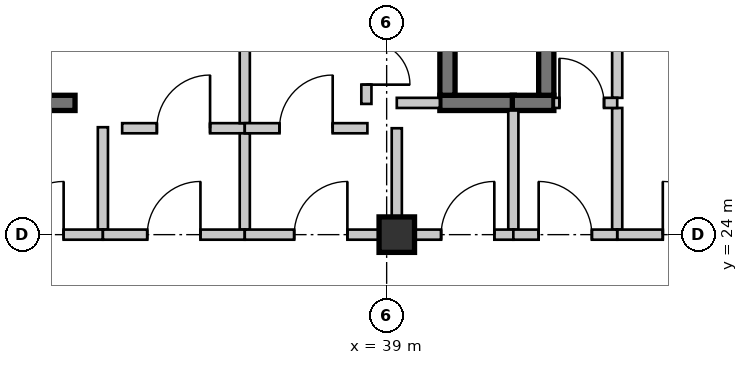
"""IFC4 building model, lengths in metres.
Left out: names, types, materials, properties, quantities, classifications, styles, units other than length and angle.
Written with IfcOpenShell. Run it as: python <this file> out.ifc"""

import sys

from ifc_helpers import new_model, si_unit, direction, frame, frame_2d, origin, origin_2d, place, context, subcontext, project, spatial, rectangle, extrude, source, transform, mapped, element, fill, save


model = new_model("IFC4")
c1 = context("Model", 3, precision=1e-05, world=origin(), true_north=direction((0.0, 1.0)))
c2 = subcontext(c1, "Body", "Model", "MODEL_VIEW")
j1 = project(units=[si_unit("LENGTHUNIT", "METRE"), si_unit("PLANEANGLEUNIT", "RADIAN")], contexts=[c1])
p1 = place(None, origin())
s1 = spatial("IfcSite", under=j1, at=p1, CompositionType="ELEMENT")
p2 = place(p1, origin())
s2 = spatial("IfcBuilding", under=s1, at=p2, CompositionType="ELEMENT")
p3 = place(p2, frame((0.0, 0.0, 65.1)))
s3 = spatial("IfcBuildingStorey", under=s2, at=p3, CompositionType="ELEMENT", Elevation=65.1)
m1 = source(origin(), c2, "Body", "SweptSolid", [
    extrude(rectangle(XDim=0.7, YDim=0.7, at=origin_2d()), origin(), (0.0, 0.0, 1.0), 3.15),
])
p4 = place(p3, frame((39.2, 24.0, 0.0), z_axis=(0.0, 0.0, 1.0), x_axis=(1.0, 0.0, 0.0)))
e1 = element("IfcColumn", 1, at=p4, inside=s3, PredefinedType="COLUMN", context=c2, shape_type="MappedRepresentation", body=[
    mapped(m1, transform((0.0, 0.0, 0.0), scale=1.0)),
])
m2 = source(origin(), c2, "Body", "SweptSolid", [
    extrude(rectangle(XDim=2.4, YDim=0.2, at=frame_2d((1.2, 0.0))), origin(), (0.0, 0.0, 1.0), 2.93),
])
p5 = place(p3, frame((43.55, 26.5, 0.0), z_axis=(0.0, 0.0, 1.0), x_axis=(0.0, -1.0, 0.0)))
e2 = element("IfcWall", 2, at=p5, inside=s3, PredefinedType="SOLIDWALL", context=c2, shape_type="MappedRepresentation", body=[
    mapped(m2, transform((0.0, 0.0, 0.0), scale=1.0)),
])
m3 = source(origin(), c2, "Body", "SweptSolid", [
    extrude(rectangle(XDim=1.35, YDim=0.2, at=frame_2d((0.675, 0.0))), origin(), (0.0, 0.0, 1.0), 2.93),
])
p6 = place(p3, frame((43.55, 28.05, 0.0), z_axis=(0.0, 0.0, 1.0), x_axis=(0.0, -1.0, 0.0)))
e3 = element("IfcWall", 3, at=p6, inside=s3, PredefinedType="SOLIDWALL", context=c2, shape_type="MappedRepresentation", body=[
    mapped(m3, transform((0.0, 0.0, 0.0), scale=1.0)),
])
m4 = source(origin(), c2, "Body", "SweptSolid", [
    extrude(rectangle(XDim=2.7, YDim=0.2, at=frame_2d((1.35, 0.0))), origin(), (0.0, 0.0, 1.0), 2.397),
])
p7 = place(p3, frame((43.55, 24.0, 0.0), z_axis=(0.0, 0.0, 1.0), x_axis=(1.0, 0.0, 0.0)))
e4 = element("IfcWall", 4, at=p7, inside=s3, PredefinedType="SOLIDWALL", context=c2, shape_type="MappedRepresentation", body=[
    mapped(m4, transform((0.0, 0.0, 0.0), scale=1.0)),
])
m5 = source(origin(), c2, "Body", "SweptSolid", [
    extrude(rectangle(XDim=1.05, YDim=2.1, at=frame_2d((0.525, 1.05))), frame((0.0, 0.11, 0.0), z_axis=(0.0, -1.0, 0.0), x_axis=(1.0, 0.0, 0.0)), (0.0, 0.0, 1.0), 0.22),
])
p8 = place(p7, frame((0.9, 0.0, 0.0)))
e5 = element("IfcOpeningElement", 5, at=p8, cuts=e4, PredefinedType="OPENING", context=c2, shape_type="MappedRepresentation", body=[
    mapped(m5, transform((0.0, 0.0, 0.0), scale=1.0)),
])
m6 = source(origin(), c2, "Body", "SweptSolid", [
    extrude(rectangle(XDim=2.2, YDim=0.3, at=frame_2d((1.1, 0.0))), origin(), (0.0, 0.0, 1.0), 2.93),
])
p9 = place(p3, frame((30.65, 26.6, 0.0), z_axis=(0.0, 0.0, 1.0), x_axis=(1.0, 0.0, 0.0)))
e6 = element("IfcWall", 6, at=p9, inside=s3, PredefinedType="SHEAR", context=c2, shape_type="MappedRepresentation", body=[
    mapped(m6, transform((0.0, 0.0, 0.0), scale=1.0)),
])
m7 = source(origin(), c2, "Body", "SweptSolid", [
    extrude(rectangle(XDim=1.47, YDim=0.3, at=frame_2d((0.735, 0.0))), origin(), (0.0, 0.0, 1.0), 2.93),
])
p10 = place(p3, frame((40.05, 26.6, 0.0), z_axis=(0.0, 0.0, 1.0), x_axis=(1.0, 0.0, 0.0)))
e7 = element("IfcWall", 7, at=p10, inside=s3, PredefinedType="SHEAR", context=c2, shape_type="MappedRepresentation", body=[
    mapped(m7, transform((0.0, 0.0, 0.0), scale=1.0)),
])
m8 = source(origin(), c2, "Body", "SweptSolid", [
    extrude(rectangle(XDim=1.3, YDim=0.3, at=frame_2d((0.65, 0.0))), origin(), (0.0, 0.0, 1.0), 2.93),
])
p11 = place(p3, frame((40.2, 28.05, 0.0), z_axis=(0.0, 0.0, 1.0), x_axis=(0.0, -1.0, 0.0)))
e8 = element("IfcWall", 8, at=p11, inside=s3, PredefinedType="SHEAR", context=c2, shape_type="MappedRepresentation", body=[
    mapped(m8, transform((0.0, 0.0, 0.0), scale=1.0)),
])
m9 = source(origin(), c2, "Body", "SweptSolid", [
    extrude(rectangle(XDim=0.82, YDim=0.3, at=frame_2d((0.41, 0.0))), origin(), (0.0, 0.0, 1.0), 2.93),
])
p12 = place(p3, frame((41.48, 26.6, 0.0), z_axis=(0.0, 0.0, 1.0), x_axis=(1.0, 0.0, 0.0)))
e9 = element("IfcWall", 9, at=p12, inside=s3, PredefinedType="SHEAR", context=c2, shape_type="MappedRepresentation", body=[
    mapped(m9, transform((0.0, 0.0, 0.0), scale=1.0)),
])
p13 = place(p3, frame((42.15, 26.75, 0.0), z_axis=(0.0, 0.0, 1.0), x_axis=(0.0, 1.0, 0.0)))
e10 = element("IfcWall", 10, at=p13, inside=s3, PredefinedType="SHEAR", context=c2, shape_type="MappedRepresentation", body=[
    mapped(m8, transform((0.0, 0.0, 0.0), scale=1.0)),
])
m10 = source(origin(), c2, "Body", "SweptSolid", [
    extrude(rectangle(XDim=2.02, YDim=0.2, at=frame_2d((1.01, 0.0))), origin(), (0.0, 0.0, 1.0), 2.93),
])
p14 = place(p3, frame((33.4, 26.12, 0.0), z_axis=(0.0, 0.0, 1.0), x_axis=(0.0, -1.0, 0.0)))
e11 = element("IfcWall", 11, at=p14, inside=s3, PredefinedType="SOLIDWALL", context=c2, shape_type="MappedRepresentation", body=[
    mapped(m10, transform((0.0, 0.0, 0.0), scale=1.0)),
])
m11 = source(origin(), c2, "Body", "SweptSolid", [
    extrude(rectangle(XDim=2.6, YDim=0.2, at=frame_2d((1.3, 0.0))), origin(), (0.0, 0.0, 1.0), 2.47),
])
p15 = place(p3, frame((33.4, 24.0, 0.0), z_axis=(0.0, 0.0, 1.0), x_axis=(-1.0, 0.0, 0.0)))
e12 = element("IfcWall", 12, at=p15, inside=s3, PredefinedType="SOLIDWALL", context=c2, shape_type="MappedRepresentation", body=[
    mapped(m11, transform((0.0, 0.0, 0.0), scale=1.0)),
])
p16 = place(p15, frame((0.775, 0.0, 0.0)))
e13 = element("IfcOpeningElement", 13, at=p16, cuts=e12, PredefinedType="OPENING", context=c2, shape_type="MappedRepresentation", body=[
    mapped(m5, transform((0.0, 0.0, 0.0), scale=1.0)),
])
m12 = source(origin(), c2, "Body", "SweptSolid", [
    extrude(rectangle(XDim=2.42, YDim=0.2, at=frame_2d((1.21, 0.0))), origin(), (0.0, 0.0, 1.0), 2.93),
])
p17 = place(p3, frame((33.78, 26.1, 0.0), z_axis=(0.0, 0.0, 1.0), x_axis=(1.0, 0.0, 0.0)))
e14 = element("IfcWall", 14, at=p17, inside=s3, PredefinedType="SOLIDWALL", context=c2, shape_type="MappedRepresentation", body=[
    mapped(m12, transform((0.0, 0.0, 0.0), scale=1.0)),
])
p18 = place(p17, frame((0.685, 0.0, 0.0)))
e15 = element("IfcOpeningElement", 15, at=p18, cuts=e14, PredefinedType="OPENING", context=c2, shape_type="MappedRepresentation", body=[
    mapped(m5, transform((0.0, 0.0, 0.0), scale=1.0)),
])
m13 = source(origin(), c2, "Body", "SweptSolid", [
    extrude(rectangle(XDim=1.9, YDim=0.2, at=frame_2d((0.95, 0.0))), origin(), (0.0, 0.0, 1.0), 2.93),
])
p19 = place(p3, frame((36.2, 26.0, 0.0), z_axis=(0.0, 0.0, 1.0), x_axis=(0.0, -1.0, 0.0)))
e16 = element("IfcWall", 16, at=p19, inside=s3, PredefinedType="SOLIDWALL", context=c2, shape_type="MappedRepresentation", body=[
    mapped(m13, transform((0.0, 0.0, 0.0), scale=1.0)),
])
m14 = source(origin(), c2, "Body", "SweptSolid", [
    extrude(rectangle(XDim=2.8, YDim=0.2, at=frame_2d((1.4, 0.0))), origin(), (0.0, 0.0, 1.0), 2.47),
])
p20 = place(p3, frame((36.2, 24.0, 0.0), z_axis=(0.0, 0.0, 1.0), x_axis=(-1.0, 0.0, 0.0)))
e17 = element("IfcWall", 17, at=p20, inside=s3, PredefinedType="SOLIDWALL", context=c2, shape_type="MappedRepresentation", body=[
    mapped(m14, transform((0.0, 0.0, 0.0), scale=1.0)),
])
p21 = place(p20, frame((0.875, 0.0, 0.0)))
e18 = element("IfcOpeningElement", 18, at=p21, cuts=e17, PredefinedType="OPENING", context=c2, shape_type="MappedRepresentation", body=[
    mapped(m5, transform((0.0, 0.0, 0.0), scale=1.0)),
])
m15 = source(origin(), c2, "Body", "SweptSolid", [
    extrude(rectangle(XDim=1.9, YDim=0.2, at=frame_2d((0.95, 0.0))), origin(), (0.0, 0.0, 1.0), 2.93),
])
p22 = place(p3, frame((36.2, 28.1, 0.0), z_axis=(0.0, 0.0, 1.0), x_axis=(0.0, -1.0, 0.0)))
e19 = element("IfcWall", 19, at=p22, inside=s3, PredefinedType="SOLIDWALL", context=c2, shape_type="MappedRepresentation", body=[
    mapped(m15, transform((0.0, 0.0, 0.0), scale=1.0)),
])
m16 = source(origin(), c2, "Body", "SweptSolid", [
    extrude(rectangle(XDim=2.42, YDim=0.2, at=frame_2d((1.21, 0.0))), origin(), (0.0, 0.0, 1.0), 2.93),
])
p23 = place(p3, frame((36.2, 26.1, 0.0), z_axis=(0.0, 0.0, 1.0), x_axis=(1.0, 0.0, 0.0)))
e20 = element("IfcWall", 20, at=p23, inside=s3, PredefinedType="SOLIDWALL", context=c2, shape_type="MappedRepresentation", body=[
    mapped(m16, transform((0.0, 0.0, 0.0), scale=1.0)),
])
p24 = place(p23, frame((0.685, 0.0, 0.0)))
e21 = element("IfcOpeningElement", 21, at=p24, cuts=e20, PredefinedType="OPENING", context=c2, shape_type="MappedRepresentation", body=[
    mapped(m5, transform((0.0, 0.0, 0.0), scale=1.0)),
])
m17 = source(origin(), c2, "Body", "SweptSolid", [
    extrude(rectangle(XDim=2.0, YDim=0.2, at=frame_2d((1.0, 0.0))), origin(), (0.0, 0.0, 1.0), 2.47),
])
p25 = place(p3, frame((39.2, 26.1, 0.0), z_axis=(0.0, 0.0, 1.0), x_axis=(0.0, -1.0, 0.0)))
e22 = element("IfcWall", 22, at=p25, inside=s3, PredefinedType="SOLIDWALL", context=c2, shape_type="MappedRepresentation", body=[
    mapped(m17, transform((0.0, 0.0, 0.0), scale=1.0)),
])
m18 = source(origin(), c2, "Body", "SweptSolid", [
    extrude(rectangle(XDim=3.0, YDim=0.2, at=frame_2d((1.5, 0.0))), origin(), (0.0, 0.0, 1.0), 2.47),
])
p26 = place(p3, frame((39.2, 24.0, 0.0), z_axis=(0.0, 0.0, 1.0), x_axis=(-1.0, 0.0, 0.0)))
e23 = element("IfcWall", 23, at=p26, inside=s3, PredefinedType="SOLIDWALL", context=c2, shape_type="MappedRepresentation", body=[
    mapped(m18, transform((0.0, 0.0, 0.0), scale=1.0)),
])
p27 = place(p26, frame((0.975, 0.0, 0.0)))
e24 = element("IfcOpeningElement", 24, at=p27, cuts=e23, PredefinedType="OPENING", context=c2, shape_type="MappedRepresentation", body=[
    mapped(m5, transform((0.0, 0.0, 0.0), scale=1.0)),
])
m19 = source(origin(), c2, "Body", "SweptSolid", [
    extrude(rectangle(XDim=1.47, YDim=0.2, at=frame_2d((0.735, 0.0))), origin(), (0.0, 0.0, 1.0), 2.93),
])
p28 = place(p3, frame((38.6, 28.05, 0.0), z_axis=(0.0, 0.0, 1.0), x_axis=(0.0, -1.0, 0.0)))
e25 = element("IfcWall", 25, at=p28, inside=s3, PredefinedType="SOLIDWALL", context=c2, shape_type="MappedRepresentation", body=[
    mapped(m19, transform((0.0, 0.0, 0.0), scale=1.0)),
])
m20 = source(origin(), c2, "Body", "SweptSolid", [
    extrude(rectangle(XDim=0.86, YDim=2.1, at=frame_2d((0.43, 1.05))), frame((0.0, 0.11, 0.0), z_axis=(0.0, -1.0, 0.0), x_axis=(1.0, 0.0, 0.0)), (0.0, 0.0, 1.0), 0.22),
])
p29 = place(p28, frame((0.23, 0.0, 0.0)))
e26 = element("IfcOpeningElement", 26, at=p29, cuts=e25, PredefinedType="OPENING", context=c2, shape_type="MappedRepresentation", body=[
    mapped(m20, transform((0.0, 0.0, 0.0), scale=1.0)),
])
m21 = source(origin(), c2, "Body", "SweptSolid", [
    extrude(rectangle(XDim=0.85, YDim=0.2, at=frame_2d((0.425, 0.0))), origin(), (0.0, 0.0, 1.0), 2.93),
])
p30 = place(p3, frame((39.2, 26.6, 0.0), z_axis=(0.0, 0.0, 1.0), x_axis=(1.0, 0.0, 0.0)))
e27 = element("IfcWall", 27, at=p30, inside=s3, PredefinedType="SOLIDWALL", context=c2, shape_type="MappedRepresentation", body=[
    mapped(m21, transform((0.0, 0.0, 0.0), scale=1.0)),
])
m22 = source(origin(), c2, "Body", "SweptSolid", [
    extrude(rectangle(XDim=2.35, YDim=0.2, at=frame_2d((1.175, 0.0))), origin(), (0.0, 0.0, 1.0), 2.93),
])
p31 = place(p3, frame((41.5, 26.45, 0.0), z_axis=(0.0, 0.0, 1.0), x_axis=(0.0, -1.0, 0.0)))
e28 = element("IfcWall", 28, at=p31, inside=s3, PredefinedType="SOLIDWALL", context=c2, shape_type="MappedRepresentation", body=[
    mapped(m22, transform((0.0, 0.0, 0.0), scale=1.0)),
])
m23 = source(origin(), c2, "Body", "SweptSolid", [
    extrude(rectangle(XDim=2.3, YDim=0.2, at=frame_2d((1.15, 0.0))), origin(), (0.0, 0.0, 1.0), 2.397),
])
p32 = place(p3, frame((41.5, 24.0, 0.0), z_axis=(0.0, 0.0, 1.0), x_axis=(-1.0, 0.0, 0.0)))
e29 = element("IfcWall", 29, at=p32, inside=s3, PredefinedType="SOLIDWALL", context=c2, shape_type="MappedRepresentation", body=[
    mapped(m23, transform((0.0, 0.0, 0.0), scale=1.0)),
])
p33 = place(p32, frame((0.375, 0.0, 0.0)))
e30 = element("IfcOpeningElement", 30, at=p33, cuts=e29, PredefinedType="OPENING", context=c2, shape_type="MappedRepresentation", body=[
    mapped(m5, transform((0.0, 0.0, 0.0), scale=1.0)),
])
m24 = source(origin(), c2, "Body", "SweptSolid", [
    extrude(rectangle(XDim=1.25, YDim=0.2, at=frame_2d((0.625, 0.0))), origin(), (0.0, 0.0, 1.0), 2.93),
])
p34 = place(p3, frame((42.3, 26.6, 0.0), z_axis=(0.0, 0.0, 1.0), x_axis=(1.0, 0.0, 0.0)))
e31 = element("IfcWall", 31, at=p34, inside=s3, PredefinedType="SOLIDWALL", context=c2, shape_type="MappedRepresentation", body=[
    mapped(m24, transform((0.0, 0.0, 0.0), scale=1.0)),
])
m25 = source(origin(), c2, "Body", "SweptSolid", [
    extrude(rectangle(XDim=0.88, YDim=2.1, at=frame_2d((0.44, 1.05))), frame((0.0, 0.11, 0.0), z_axis=(0.0, -1.0, 0.0), x_axis=(1.0, 0.0, 0.0)), (0.0, 0.0, 1.0), 0.22),
])
p35 = place(p34, frame((0.11, 0.0, 0.0)))
e32 = element("IfcOpeningElement", 32, at=p35, cuts=e31, PredefinedType="OPENING", context=c2, shape_type="MappedRepresentation", body=[
    mapped(m25, transform((0.0, 0.0, 0.0), scale=1.0)),
])
m26 = source(origin(), c2, "Body", "SweptSolid", [
    extrude(rectangle(XDim=2.05, YDim=0.2, at=frame_2d((1.025, 0.0))), origin(), (0.0, 0.0, 1.0), 2.397),
])
p36 = place(p3, frame((43.55, 24.0, 0.0), z_axis=(0.0, 0.0, 1.0), x_axis=(-1.0, 0.0, 0.0)))
e33 = element("IfcWall", 33, at=p36, inside=s3, PredefinedType="SOLIDWALL", context=c2, shape_type="MappedRepresentation", body=[
    mapped(m26, transform((0.0, 0.0, 0.0), scale=1.0)),
])
p37 = place(p36, frame((0.5, 0.0, 0.0)))
e34 = element("IfcOpeningElement", 34, at=p37, cuts=e33, PredefinedType="OPENING", context=c2, shape_type="MappedRepresentation", body=[
    mapped(m5, transform((0.0, 0.0, 0.0), scale=1.0)),
])
m27 = source(origin(), c2, "Body", "SweptSolid", [
    extrude(rectangle(XDim=1.05, YDim=2.1, at=frame_2d((0.525, 1.05))), frame((0.0, 0.025, 0.0), z_axis=(0.0, -1.0, 0.0), x_axis=(1.0, 0.0, 0.0)), (0.0, 0.0, 1.0), 0.05),
])
p38 = place(p8, origin())
e35 = element("IfcDoor", 35, at=p38, inside=s3, OperationType="SINGLE_SWING_LEFT", PredefinedType="DOOR", context=c2, shape_type="MappedRepresentation", body=[
    mapped(m27, transform((0.0, 0.0, 0.0), scale=1.0)),
])
fill(e5, e35)
p39 = place(p16, frame((1.05, 0.0, 0.0), z_axis=(0.0, 0.0, 1.0), x_axis=(-1.0, 0.0, 0.0)))
e36 = element("IfcDoor", 36, at=p39, inside=s3, OperationType="SINGLE_SWING_RIGHT", PredefinedType="DOOR", context=c2, shape_type="MappedRepresentation", body=[
    mapped(m27, transform((0.0, 0.0, 0.0), scale=1.0)),
])
fill(e13, e36)
p40 = place(p18, origin())
e37 = element("IfcDoor", 37, at=p40, inside=s3, OperationType="SINGLE_SWING_RIGHT", PredefinedType="DOOR", context=c2, shape_type="MappedRepresentation", body=[
    mapped(m27, transform((0.0, 0.0, 0.0), scale=1.0)),
])
fill(e15, e37)
p41 = place(p21, frame((1.05, 0.0, 0.0), z_axis=(0.0, 0.0, 1.0), x_axis=(-1.0, 0.0, 0.0)))
e38 = element("IfcDoor", 38, at=p41, inside=s3, OperationType="SINGLE_SWING_RIGHT", PredefinedType="DOOR", context=c2, shape_type="MappedRepresentation", body=[
    mapped(m27, transform((0.0, 0.0, 0.0), scale=1.0)),
])
fill(e18, e38)
p42 = place(p24, origin())
e39 = element("IfcDoor", 39, at=p42, inside=s3, OperationType="SINGLE_SWING_RIGHT", PredefinedType="DOOR", context=c2, shape_type="MappedRepresentation", body=[
    mapped(m27, transform((0.0, 0.0, 0.0), scale=1.0)),
])
fill(e21, e39)
p43 = place(p27, frame((1.05, 0.0, 0.0), z_axis=(0.0, 0.0, 1.0), x_axis=(-1.0, 0.0, 0.0)))
e40 = element("IfcDoor", 40, at=p43, inside=s3, OperationType="SINGLE_SWING_RIGHT", PredefinedType="DOOR", context=c2, shape_type="MappedRepresentation", body=[
    mapped(m27, transform((0.0, 0.0, 0.0), scale=1.0)),
])
fill(e24, e40)
p44 = place(p33, frame((1.05, 0.0, 0.0), z_axis=(0.0, 0.0, 1.0), x_axis=(-1.0, 0.0, 0.0)))
e41 = element("IfcDoor", 41, at=p44, inside=s3, OperationType="SINGLE_SWING_RIGHT", PredefinedType="DOOR", context=c2, shape_type="MappedRepresentation", body=[
    mapped(m27, transform((0.0, 0.0, 0.0), scale=1.0)),
])
fill(e30, e41)
m28 = source(origin(), c2, "Body", "SweptSolid", [
    extrude(rectangle(XDim=0.88, YDim=2.1, at=frame_2d((0.44, 1.05))), frame((0.0, 0.025, 0.0), z_axis=(0.0, -1.0, 0.0), x_axis=(1.0, 0.0, 0.0)), (0.0, 0.0, 1.0), 0.05),
])
p45 = place(p35, origin())
e42 = element("IfcDoor", 42, at=p45, inside=s3, OperationType="SINGLE_SWING_LEFT", PredefinedType="DOOR", context=c2, shape_type="MappedRepresentation", body=[
    mapped(m28, transform((0.0, 0.0, 0.0), scale=1.0)),
])
fill(e32, e42)
p46 = place(p37, frame((1.05, 0.0, 0.0), z_axis=(0.0, 0.0, 1.0), x_axis=(-1.0, 0.0, 0.0)))
e43 = element("IfcDoor", 43, at=p46, inside=s3, OperationType="SINGLE_SWING_LEFT", PredefinedType="DOOR", context=c2, shape_type="MappedRepresentation", body=[
    mapped(m27, transform((0.0, 0.0, 0.0), scale=1.0)),
])
fill(e34, e43)
m29 = source(origin(), c2, "Body", "SweptSolid", [
    extrude(rectangle(XDim=0.86, YDim=2.1, at=frame_2d((0.43, 1.05))), frame((0.0, 0.025, 0.0), z_axis=(0.0, -1.0, 0.0), x_axis=(1.0, 0.0, 0.0)), (0.0, 0.0, 1.0), 0.05),
])
p47 = place(p29, origin())
e44 = element("IfcDoor", 44, at=p47, inside=s3, OperationType="SINGLE_SWING_RIGHT", PredefinedType="DOOR", context=c2, shape_type="MappedRepresentation", body=[
    mapped(m29, transform((0.0, 0.0, 0.0), scale=1.0)),
])
fill(e26, e44)
save(model, sys.argv[1])
